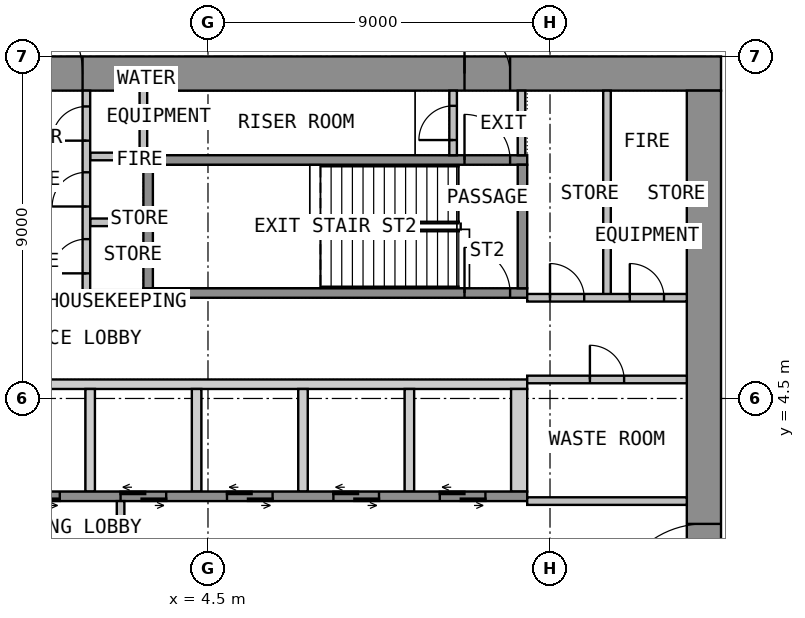
"""IFC4 building model, lengths in metres.
Left out: names, types, materials, properties, quantities, classifications, styles, units other than length and angle.
Written with IfcOpenShell. Run it as: python <this file> out.ifc"""

import sys

from ifc_helpers import new_model, si_unit, direction, frame, frame_2d, origin, place, context, subcontext, project, spatial, polyline, rectangle, outline, extrude, element, fill, save


model = new_model("IFC4")
c1 = context("Model", 3, precision=1e-05, world=origin(), true_north=direction((0.0, 1.0)))
c2 = subcontext(c1, "Body", "Model", "MODEL_VIEW")
j1 = project(units=[si_unit("LENGTHUNIT", "METRE"), si_unit("PLANEANGLEUNIT", "RADIAN")], contexts=[c1])
p1 = place(None, origin())
s1 = spatial("IfcSite", under=j1, at=p1, CompositionType="ELEMENT")
p2 = place(p1, origin())
s2 = spatial("IfcBuilding", under=s1, at=p2, CompositionType="ELEMENT")
p3 = place(p2, frame((0.0, 0.0, 15.6)))
s3 = spatial("IfcBuildingStorey", under=s2, at=p3, CompositionType="ELEMENT", Elevation=15.6)
p4 = place(p3, frame((-18.0, 13.05, 0.0), z_axis=(0.0, 0.0, 1.0), x_axis=(1.0, 0.0, 0.0)))
e1 = element("IfcWall", 1, at=p4, inside=s3, PredefinedType="SHEAR", context=c2, shape_type="SweptSolid", body=[
    extrude(rectangle(XDim=36.0, YDim=0.9, at=frame_2d((18.0, 0.0))), origin(), (0.0, 0.0, 1.0), 4.4),
])
p5 = place(p4, frame((16.8, 0.0, 0.0)))
e2 = element("IfcOpeningElement", 2, at=p5, cuts=e1, PredefinedType="OPENING", context=c2, shape_type="SweptSolid", body=[
    extrude(rectangle(XDim=2.4, YDim=2.1, at=frame_2d((1.2, 1.05))), frame((0.0, 0.46, 0.0), z_axis=(0.0, -1.0, 0.0), x_axis=(1.0, 0.0, 0.0)), (0.0, 0.0, 1.0), 0.92),
])
p6 = place(p4, frame((5.55, 0.0, 0.0)))
e3 = element("IfcOpeningElement", 3, at=p6, cuts=e1, PredefinedType="OPENING", context=c2, shape_type="SweptSolid", body=[
    extrude(rectangle(XDim=1.2, YDim=2.1, at=frame_2d((0.6, 1.05))), frame((0.0, 0.46, 0.0), z_axis=(0.0, -1.0, 0.0), x_axis=(1.0, 0.0, 0.0)), (0.0, 0.0, 1.0), 0.92),
])
p7 = place(p4, frame((29.25, 0.0, 0.0)))
e4 = element("IfcOpeningElement", 4, at=p7, cuts=e1, PredefinedType="OPENING", context=c2, shape_type="SweptSolid", body=[
    extrude(rectangle(XDim=1.2, YDim=2.1, at=frame_2d((0.6, 1.05))), frame((0.0, 0.46, 0.0), z_axis=(0.0, -1.0, 0.0), x_axis=(1.0, 0.0, 0.0)), (0.0, 0.0, 1.0), 0.92),
])
p8 = place(p3, frame((17.55, -12.6, 0.0), z_axis=(0.0, 0.0, 1.0), x_axis=(0.0, 1.0, 0.0)))
e5 = element("IfcWall", 5, at=p8, inside=s3, PredefinedType="SHEAR", context=c2, shape_type="SweptSolid", body=[
    extrude(rectangle(XDim=25.2, YDim=0.9, at=frame_2d((12.6, 0.0))), origin(), (0.0, 0.0, 1.0), 4.4),
])
p9 = place(p8, frame((11.4, 0.0, 0.0)))
e6 = element("IfcOpeningElement", 6, at=p9, cuts=e5, PredefinedType="OPENING", context=c2, shape_type="SweptSolid", body=[
    extrude(rectangle(XDim=2.4, YDim=2.1, at=frame_2d((1.2, 1.05))), frame((0.0, 0.46, 0.0), z_axis=(0.0, -1.0, 0.0), x_axis=(1.0, 0.0, 0.0)), (0.0, 0.0, 1.0), 0.92),
])
p10 = place(p3, origin())
e7 = element("IfcWall", 7, at=p10, inside=s3, PredefinedType="SHEAR", context=c2, shape_type="SweptSolid", body=[
    extrude(outline(polyline([(-12.9, 4.75), (12.9, 4.75), (12.9, 5.0), (-12.9, 5.0), (-12.9, 4.75)])), origin(), (0.0, 0.0, 1.0), 4.4),
])
p11 = place(p3, origin())
e8 = element("IfcWall", 8, at=p11, inside=s3, PredefinedType="SHEAR", context=c2, shape_type="SweptSolid", body=[
    extrude(outline(polyline([(1.275, 2.05), (1.525, 2.05), (1.525, 4.75), (1.275, 4.75), (1.275, 2.05)])), origin(), (0.0, 0.0, 1.0), 4.4),
])
p12 = place(p3, origin())
e9 = element("IfcWall", 9, at=p12, inside=s3, PredefinedType="SHEAR", context=c2, shape_type="SweptSolid", body=[
    extrude(outline(polyline([(4.075, 2.05), (4.325, 2.05), (4.325, 4.75), (4.075, 4.75), (4.075, 2.05)])), origin(), (0.0, 0.0, 1.0), 4.4),
])
p13 = place(p3, origin())
e10 = element("IfcWall", 10, at=p13, inside=s3, PredefinedType="SHEAR", context=c2, shape_type="SweptSolid", body=[
    extrude(outline(polyline([(6.875, 2.05), (7.125, 2.05), (7.125, 4.75), (6.875, 4.75), (6.875, 2.05)])), origin(), (0.0, 0.0, 1.0), 4.4),
])
p14 = place(p3, origin())
e11 = element("IfcWall", 11, at=p14, inside=s3, PredefinedType="SHEAR", context=c2, shape_type="SweptSolid", body=[
    extrude(outline(polyline([(9.675, 2.05), (9.925, 2.05), (9.925, 4.75), (9.675, 4.75), (9.675, 2.05)])), origin(), (0.0, 0.0, 1.0), 4.4),
])
p15 = place(p3, origin())
e12 = element("IfcWall", 12, at=p15, inside=s3, PredefinedType="SHEAR", context=c2, shape_type="SweptSolid", body=[
    extrude(outline(polyline([(12.475, 2.05), (12.9, 2.05), (12.9, 4.75), (12.475, 4.75), (12.475, 2.05)])), origin(), (0.0, 0.0, 1.0), 4.4),
])
p16 = place(p3, frame((-12.9, 1.925, 0.0), z_axis=(0.0, 0.0, 1.0), x_axis=(1.0, 0.0, 0.0)))
e13 = element("IfcWall", 13, at=p16, inside=s3, PredefinedType="SHEAR", context=c2, shape_type="SweptSolid", body=[
    extrude(rectangle(XDim=25.8, YDim=0.25, at=frame_2d((12.9, 0.0))), origin(), (0.0, 0.0, 1.0), 4.4),
])
p17 = place(p16, frame((9.5, 0.0, 0.0)))
e14 = element("IfcOpeningElement", 14, at=p17, cuts=e13, PredefinedType="OPENING", context=c2, shape_type="SweptSolid", body=[
    extrude(rectangle(XDim=1.2, YDim=2.1, at=frame_2d((0.6, 1.05))), frame((0.0, 0.135, 0.0), z_axis=(0.0, -1.0, 0.0), x_axis=(1.0, 0.0, 0.0)), (0.0, 0.0, 1.0), 0.27),
])
p18 = place(p16, frame((12.3, 0.0, 0.0)))
e15 = element("IfcOpeningElement", 15, at=p18, cuts=e13, PredefinedType="OPENING", context=c2, shape_type="SweptSolid", body=[
    extrude(rectangle(XDim=1.2, YDim=2.1, at=frame_2d((0.6, 1.05))), frame((0.0, 0.135, 0.0), z_axis=(0.0, -1.0, 0.0), x_axis=(1.0, 0.0, 0.0)), (0.0, 0.0, 1.0), 0.27),
])
p19 = place(p16, frame((15.1, 0.0, 0.0)))
e16 = element("IfcOpeningElement", 16, at=p19, cuts=e13, PredefinedType="OPENING", context=c2, shape_type="SweptSolid", body=[
    extrude(rectangle(XDim=1.2, YDim=2.1, at=frame_2d((0.6, 1.05))), frame((0.0, 0.135, 0.0), z_axis=(0.0, -1.0, 0.0), x_axis=(1.0, 0.0, 0.0)), (0.0, 0.0, 1.0), 0.27),
])
p20 = place(p16, frame((17.9, 0.0, 0.0)))
e17 = element("IfcOpeningElement", 17, at=p20, cuts=e13, PredefinedType="OPENING", context=c2, shape_type="SweptSolid", body=[
    extrude(rectangle(XDim=1.2, YDim=2.1, at=frame_2d((0.6, 1.05))), frame((0.0, 0.135, 0.0), z_axis=(0.0, -1.0, 0.0), x_axis=(1.0, 0.0, 0.0)), (0.0, 0.0, 1.0), 0.27),
])
p21 = place(p16, frame((20.7, 0.0, 0.0)))
e18 = element("IfcOpeningElement", 18, at=p21, cuts=e13, PredefinedType="OPENING", context=c2, shape_type="SweptSolid", body=[
    extrude(rectangle(XDim=1.2, YDim=2.1, at=frame_2d((0.6, 1.05))), frame((0.0, 0.135, 0.0), z_axis=(0.0, -1.0, 0.0), x_axis=(1.0, 0.0, 0.0)), (0.0, 0.0, 1.0), 0.27),
])
p22 = place(p16, frame((23.5, 0.0, 0.0)))
e19 = element("IfcOpeningElement", 19, at=p22, cuts=e13, PredefinedType="OPENING", context=c2, shape_type="SweptSolid", body=[
    extrude(rectangle(XDim=1.2, YDim=2.1, at=frame_2d((0.6, 1.05))), frame((0.0, 0.135, 0.0), z_axis=(0.0, -1.0, 0.0), x_axis=(1.0, 0.0, 0.0)), (0.0, 0.0, 1.0), 0.27),
])
p23 = place(p3, frame((2.2, -1.8, 0.0), z_axis=(0.0, 0.0, 1.0), x_axis=(0.0, 1.0, 0.0)))
e20 = element("IfcWall", 20, at=p23, inside=s3, PredefinedType="PARTITIONING", context=c2, shape_type="SweptSolid", body=[
    extrude(rectangle(XDim=3.6, YDim=0.2, at=frame_2d((1.8, 0.0))), origin(), (0.0, 0.0, 1.0), 4.4),
])
p24 = place(p23, frame((1.2, 0.0, 0.0)))
e21 = element("IfcOpeningElement", 21, at=p24, cuts=e20, PredefinedType="OPENING", context=c2, shape_type="SweptSolid", body=[
    extrude(rectangle(XDim=1.2, YDim=2.1, at=frame_2d((0.6, 1.05))), frame((0.0, 0.11, 0.0), z_axis=(0.0, -1.0, 0.0), x_axis=(1.0, 0.0, 0.0)), (0.0, 0.0, 1.0), 0.22),
])
p25 = place(p3, frame((2.8, 7.275, 0.0), z_axis=(0.0, 0.0, 1.0), x_axis=(1.0, 0.0, 0.0)))
e22 = element("IfcWall", 22, at=p25, inside=s3, PredefinedType="SHEAR", context=c2, shape_type="SweptSolid", body=[
    extrude(rectangle(XDim=10.1, YDim=0.25, at=frame_2d((5.05, 0.0))), origin(), (0.0, 0.0, 1.0), 4.4),
])
p26 = place(p25, frame((8.45, 0.0, 0.0)))
e23 = element("IfcOpeningElement", 23, at=p26, cuts=e22, PredefinedType="OPENING", context=c2, shape_type="SweptSolid", body=[
    extrude(rectangle(XDim=1.2, YDim=2.1, at=frame_2d((0.6, 1.05))), frame((0.0, 0.135, 0.0), z_axis=(0.0, -1.0, 0.0), x_axis=(1.0, 0.0, 0.0)), (0.0, 0.0, 1.0), 0.27),
])
p27 = place(p3, frame((2.8, 10.775, 0.0), z_axis=(0.0, 0.0, 1.0), x_axis=(1.0, 0.0, 0.0)))
e24 = element("IfcWall", 24, at=p27, inside=s3, PredefinedType="SHEAR", context=c2, shape_type="SweptSolid", body=[
    extrude(rectangle(XDim=10.1, YDim=0.25, at=frame_2d((5.05, 0.0))), origin(), (0.0, 0.0, 1.0), 4.4),
])
p28 = place(p27, frame((8.45, 0.0, 0.0)))
e25 = element("IfcOpeningElement", 25, at=p28, cuts=e24, PredefinedType="OPENING", context=c2, shape_type="SweptSolid", body=[
    extrude(rectangle(XDim=1.2, YDim=2.1, at=frame_2d((0.6, 1.05))), frame((0.0, 0.135, 0.0), z_axis=(0.0, -1.0, 0.0), x_axis=(1.0, 0.0, 0.0)), (0.0, 0.0, 1.0), 0.27),
])
for number, where, z_axis, x_axis in (
    (26, (2.925, 7.4, 0.0), (0.0, 0.0, 1.0), (0.0, 1.0, 0.0)),
    (27, (12.775, 7.4, 0.0), (0.0, 0.0, 1.0), (0.0, 1.0, 0.0)),
):
    element("IfcWall", number, at=place(p3, frame(where, z_axis=z_axis, x_axis=x_axis)), inside=s3, PredefinedType="SHEAR", context=c2, shape_type="SweptSolid", body=[
        extrude(rectangle(XDim=3.25, YDim=0.25, at=frame_2d((1.625, 0.0))), origin(), (0.0, 0.0, 1.0), 4.4),
    ])
for number, where, z_axis, x_axis in (
    (28, (1.4, 7.25, 0.0), (0.0, 0.0, 1.0), (1.0, 0.0, 0.0)),
    (29, (1.4, 9.135, 0.0), (0.0, 0.0, 1.0), (1.0, 0.0, 0.0)),
    (30, (1.4, 10.867, 0.0), (0.0, 0.0, 1.0), (1.0, 0.0, 0.0)),
):
    element("IfcWall", number, at=place(p3, frame(where, z_axis=z_axis, x_axis=x_axis)), inside=s3, PredefinedType="PARTITIONING", context=c2, shape_type="SweptSolid", body=[
        extrude(rectangle(XDim=1.4, YDim=0.2, at=frame_2d((0.7, 0.0))), origin(), (0.0, 0.0, 1.0), 4.4),
    ])
p29 = place(p3, frame((1.3, 7.15, 0.0), z_axis=(0.0, 0.0, 1.0), x_axis=(0.0, 1.0, 0.0)))
e31 = element("IfcWall", 31, at=p29, inside=s3, PredefinedType="PARTITIONING", context=c2, shape_type="SweptSolid", body=[
    extrude(rectangle(XDim=5.45, YDim=0.2, at=frame_2d((2.725, 0.0))), origin(), (0.0, 0.0, 1.0), 4.4),
])
p30 = place(p29, frame((0.643, 0.0, 0.0)))
e32 = element("IfcOpeningElement", 32, at=p30, cuts=e31, PredefinedType="OPENING", context=c2, shape_type="SweptSolid", body=[
    extrude(rectangle(XDim=0.9, YDim=2.1, at=frame_2d((0.45, 1.05))), frame((0.0, 0.11, 0.0), z_axis=(0.0, -1.0, 0.0), x_axis=(1.0, 0.0, 0.0)), (0.0, 0.0, 1.0), 0.22),
])
p31 = place(p29, frame((2.401, 0.0, 0.0)))
e33 = element("IfcOpeningElement", 33, at=p31, cuts=e31, PredefinedType="OPENING", context=c2, shape_type="SweptSolid", body=[
    extrude(rectangle(XDim=0.9, YDim=2.1, at=frame_2d((0.45, 1.05))), frame((0.0, 0.11, 0.0), z_axis=(0.0, -1.0, 0.0), x_axis=(1.0, 0.0, 0.0)), (0.0, 0.0, 1.0), 0.22),
])
p32 = place(p29, frame((4.134, 0.0, 0.0)))
e34 = element("IfcOpeningElement", 34, at=p32, cuts=e31, PredefinedType="OPENING", context=c2, shape_type="SweptSolid", body=[
    extrude(rectangle(XDim=0.9, YDim=2.1, at=frame_2d((0.45, 1.05))), frame((0.0, 0.11, 0.0), z_axis=(0.0, -1.0, 0.0), x_axis=(1.0, 0.0, 0.0)), (0.0, 0.0, 1.0), 0.22),
])
p33 = place(p3, frame((12.75, 10.9, 0.0), z_axis=(0.0, 0.0, 1.0), x_axis=(0.0, 1.0, 0.0)))
e35 = element("IfcWall", 35, at=p33, inside=s3, PredefinedType="PARTITIONING", context=c2, shape_type="SweptSolid", body=[
    extrude(rectangle(XDim=1.7, YDim=0.2, at=frame_2d((0.85, 0.0))), origin(), (0.0, 0.0, 1.0), 4.4),
])
p34 = place(p3, frame((10.95, 10.9, 0.0), z_axis=(0.0, 0.0, 1.0), x_axis=(0.0, 1.0, 0.0)))
e36 = element("IfcWall", 36, at=p34, inside=s3, PredefinedType="PARTITIONING", context=c2, shape_type="SweptSolid", body=[
    extrude(rectangle(XDim=1.7, YDim=0.2, at=frame_2d((0.85, 0.0))), origin(), (0.0, 0.0, 1.0), 4.4),
])
p35 = place(p34, frame((0.4, 0.0, 0.0)))
e37 = element("IfcOpeningElement", 37, at=p35, cuts=e36, PredefinedType="OPENING", context=c2, shape_type="SweptSolid", body=[
    extrude(rectangle(XDim=0.9, YDim=2.1, at=frame_2d((0.45, 1.05))), frame((0.0, 0.11, 0.0), z_axis=(0.0, -1.0, 0.0), x_axis=(1.0, 0.0, 0.0)), (0.0, 0.0, 1.0), 0.22),
])
p36 = place(p3, frame((15.0, 7.15, 0.0), z_axis=(0.0, 0.0, 1.0), x_axis=(0.0, 1.0, 0.0)))
e38 = element("IfcWall", 38, at=p36, inside=s3, PredefinedType="PARTITIONING", context=c2, shape_type="SweptSolid", body=[
    extrude(rectangle(XDim=5.45, YDim=0.2, at=frame_2d((2.725, 0.0))), origin(), (0.0, 0.0, 1.0), 4.4),
])
p37 = place(p3, frame((12.9, 7.15, 0.0), z_axis=(0.0, 0.0, 1.0), x_axis=(1.0, 0.0, 0.0)))
e39 = element("IfcWall", 39, at=p37, inside=s3, PredefinedType="PARTITIONING", context=c2, shape_type="SweptSolid", body=[
    extrude(rectangle(XDim=4.2, YDim=0.2, at=frame_2d((2.1, 0.0))), origin(), (0.0, 0.0, 1.0), 4.4),
])
p38 = place(p37, frame((0.6, 0.0, 0.0)))
e40 = element("IfcOpeningElement", 40, at=p38, cuts=e39, PredefinedType="OPENING", context=c2, shape_type="SweptSolid", body=[
    extrude(rectangle(XDim=0.9, YDim=2.1, at=frame_2d((0.45, 1.05))), frame((0.0, 0.11, 0.0), z_axis=(0.0, -1.0, 0.0), x_axis=(1.0, 0.0, 0.0)), (0.0, 0.0, 1.0), 0.22),
])
p39 = place(p37, frame((2.7, 0.0, 0.0)))
e41 = element("IfcOpeningElement", 41, at=p39, cuts=e39, PredefinedType="OPENING", context=c2, shape_type="SweptSolid", body=[
    extrude(rectangle(XDim=0.9, YDim=2.1, at=frame_2d((0.45, 1.05))), frame((0.0, 0.11, 0.0), z_axis=(0.0, -1.0, 0.0), x_axis=(1.0, 0.0, 0.0)), (0.0, 0.0, 1.0), 0.22),
])
p40 = place(p3, frame((12.9, 5.0, 0.0), z_axis=(0.0, 0.0, 1.0), x_axis=(1.0, 0.0, 0.0)))
e42 = element("IfcWall", 42, at=p40, inside=s3, PredefinedType="PARTITIONING", context=c2, shape_type="SweptSolid", body=[
    extrude(rectangle(XDim=4.2, YDim=0.2, at=frame_2d((2.1, 0.0))), origin(), (0.0, 0.0, 1.0), 4.4),
])
p41 = place(p40, frame((1.65, 0.0, 0.0)))
e43 = element("IfcOpeningElement", 43, at=p41, cuts=e42, PredefinedType="OPENING", context=c2, shape_type="SweptSolid", body=[
    extrude(rectangle(XDim=0.9, YDim=2.1, at=frame_2d((0.45, 1.05))), frame((0.0, 0.11, 0.0), z_axis=(0.0, -1.0, 0.0), x_axis=(1.0, 0.0, 0.0)), (0.0, 0.0, 1.0), 0.22),
])
p42 = place(p3, frame((12.9, 1.8, 0.0), z_axis=(0.0, 0.0, 1.0), x_axis=(1.0, 0.0, 0.0)))
e44 = element("IfcWall", 44, at=p42, inside=s3, PredefinedType="PARTITIONING", context=c2, shape_type="SweptSolid", body=[
    extrude(rectangle(XDim=4.2, YDim=0.2, at=frame_2d((2.1, 0.0))), origin(), (0.0, 0.0, 1.0), 4.4),
])
p43 = place(p3, frame((2.8, 10.969, 0.0), z_axis=(0.0, 0.0, 1.0), x_axis=(0.0, 1.0, 0.0)))
e45 = element("IfcWall", 45, at=p43, inside=s3, PredefinedType="PARTITIONING", context=c2, shape_type="SweptSolid", body=[
    extrude(rectangle(XDim=1.631, YDim=0.2, at=frame_2d((0.815, 0.0))), origin(), (0.0, 0.0, 1.0), 4.4),
])
p44 = place(p9, origin())
e46 = element("IfcDoor", 46, at=p44, inside=s3, OperationType="DOUBLE_DOOR_DOUBLE_SWING", PredefinedType="DOOR", context=c2, shape_type="SweptSolid", body=[
    extrude(rectangle(XDim=2.4, YDim=2.1, at=frame_2d((1.2, 1.05))), frame((0.0, 0.025, 0.0), z_axis=(0.0, -1.0, 0.0), x_axis=(1.0, 0.0, 0.0)), (0.0, 0.0, 1.0), 0.05),
])
fill(e6, e46)
p45 = place(p5, origin())
e47 = element("IfcDoor", 47, at=p45, inside=s3, OperationType="DOUBLE_DOOR_DOUBLE_SWING", PredefinedType="DOOR", context=c2, shape_type="SweptSolid", body=[
    extrude(rectangle(XDim=2.4, YDim=2.1, at=frame_2d((1.2, 1.05))), frame((0.0, 0.025, 0.0), z_axis=(0.0, -1.0, 0.0), x_axis=(1.0, 0.0, 0.0)), (0.0, 0.0, 1.0), 0.05),
])
fill(e2, e47)
p46 = place(p7, origin())
e48 = element("IfcDoor", 48, at=p46, inside=s3, OperationType="SINGLE_SWING_RIGHT", PredefinedType="DOOR", context=c2, shape_type="SweptSolid", body=[
    extrude(rectangle(XDim=1.2, YDim=2.1, at=frame_2d((0.6, 1.05))), frame((0.0, 0.025, 0.0), z_axis=(0.0, -1.0, 0.0), x_axis=(1.0, 0.0, 0.0)), (0.0, 0.0, 1.0), 0.05),
])
fill(e4, e48)
p47 = place(p18, origin())
e49 = element("IfcDoor", 49, at=p47, inside=s3, OperationType="DOUBLE_DOOR_SLIDING", PredefinedType="DOOR", context=c2, shape_type="SweptSolid", body=[
    extrude(rectangle(XDim=1.2, YDim=2.1, at=frame_2d((0.6, 1.05))), frame((0.0, 0.025, 0.0), z_axis=(0.0, -1.0, 0.0), x_axis=(1.0, 0.0, 0.0)), (0.0, 0.0, 1.0), 0.05),
])
fill(e15, e49)
p48 = place(p19, origin())
e50 = element("IfcDoor", 50, at=p48, inside=s3, OperationType="DOUBLE_DOOR_SLIDING", PredefinedType="DOOR", context=c2, shape_type="SweptSolid", body=[
    extrude(rectangle(XDim=1.2, YDim=2.1, at=frame_2d((0.6, 1.05))), frame((0.0, 0.025, 0.0), z_axis=(0.0, -1.0, 0.0), x_axis=(1.0, 0.0, 0.0)), (0.0, 0.0, 1.0), 0.05),
])
fill(e16, e50)
p49 = place(p20, origin())
e51 = element("IfcDoor", 51, at=p49, inside=s3, OperationType="DOUBLE_DOOR_SLIDING", PredefinedType="DOOR", context=c2, shape_type="SweptSolid", body=[
    extrude(rectangle(XDim=1.2, YDim=2.1, at=frame_2d((0.6, 1.05))), frame((0.0, 0.025, 0.0), z_axis=(0.0, -1.0, 0.0), x_axis=(1.0, 0.0, 0.0)), (0.0, 0.0, 1.0), 0.05),
])
fill(e17, e51)
p50 = place(p21, origin())
e52 = element("IfcDoor", 52, at=p50, inside=s3, OperationType="DOUBLE_DOOR_SLIDING", PredefinedType="DOOR", context=c2, shape_type="SweptSolid", body=[
    extrude(rectangle(XDim=1.2, YDim=2.1, at=frame_2d((0.6, 1.05))), frame((0.0, 0.025, 0.0), z_axis=(0.0, -1.0, 0.0), x_axis=(1.0, 0.0, 0.0)), (0.0, 0.0, 1.0), 0.05),
])
fill(e18, e52)
p51 = place(p22, origin())
e53 = element("IfcDoor", 53, at=p51, inside=s3, OperationType="DOUBLE_DOOR_SLIDING", PredefinedType="DOOR", context=c2, shape_type="SweptSolid", body=[
    extrude(rectangle(XDim=1.2, YDim=2.1, at=frame_2d((0.6, 1.05))), frame((0.0, 0.025, 0.0), z_axis=(0.0, -1.0, 0.0), x_axis=(1.0, 0.0, 0.0)), (0.0, 0.0, 1.0), 0.05),
])
fill(e19, e53)
p52 = place(p26, origin())
e54 = element("IfcDoor", 54, at=p52, inside=s3, OperationType="SINGLE_SWING_LEFT", PredefinedType="DOOR", context=c2, shape_type="SweptSolid", body=[
    extrude(rectangle(XDim=1.2, YDim=2.1, at=frame_2d((0.6, 1.05))), frame((0.0, 0.025, 0.0), z_axis=(0.0, -1.0, 0.0), x_axis=(1.0, 0.0, 0.0)), (0.0, 0.0, 1.0), 0.05),
])
fill(e23, e54)
p53 = place(p30, origin())
e55 = element("IfcDoor", 55, at=p53, inside=s3, OperationType="SINGLE_SWING_LEFT", PredefinedType="DOOR", context=c2, shape_type="SweptSolid", body=[
    extrude(rectangle(XDim=0.9, YDim=2.1, at=frame_2d((0.45, 1.05))), frame((0.0, 0.025, 0.0), z_axis=(0.0, -1.0, 0.0), x_axis=(1.0, 0.0, 0.0)), (0.0, 0.0, 1.0), 0.05),
])
fill(e32, e55)
p54 = place(p31, origin())
e56 = element("IfcDoor", 56, at=p54, inside=s3, OperationType="SINGLE_SWING_LEFT", PredefinedType="DOOR", context=c2, shape_type="SweptSolid", body=[
    extrude(rectangle(XDim=0.9, YDim=2.1, at=frame_2d((0.45, 1.05))), frame((0.0, 0.025, 0.0), z_axis=(0.0, -1.0, 0.0), x_axis=(1.0, 0.0, 0.0)), (0.0, 0.0, 1.0), 0.05),
])
fill(e33, e56)
p55 = place(p32, origin())
e57 = element("IfcDoor", 57, at=p55, inside=s3, OperationType="SINGLE_SWING_LEFT", PredefinedType="DOOR", context=c2, shape_type="SweptSolid", body=[
    extrude(rectangle(XDim=0.9, YDim=2.1, at=frame_2d((0.45, 1.05))), frame((0.0, 0.025, 0.0), z_axis=(0.0, -1.0, 0.0), x_axis=(1.0, 0.0, 0.0)), (0.0, 0.0, 1.0), 0.05),
])
fill(e34, e57)
p56 = place(p28, origin())
e58 = element("IfcDoor", 58, at=p56, inside=s3, OperationType="SINGLE_SWING_RIGHT", PredefinedType="DOOR", context=c2, shape_type="SweptSolid", body=[
    extrude(rectangle(XDim=1.2, YDim=2.1, at=frame_2d((0.6, 1.05))), frame((0.0, 0.025, 0.0), z_axis=(0.0, -1.0, 0.0), x_axis=(1.0, 0.0, 0.0)), (0.0, 0.0, 1.0), 0.05),
])
fill(e25, e58)
p57 = place(p35, origin())
e59 = element("IfcDoor", 59, at=p57, inside=s3, OperationType="SINGLE_SWING_LEFT", PredefinedType="DOOR", context=c2, shape_type="SweptSolid", body=[
    extrude(rectangle(XDim=0.9, YDim=2.1, at=frame_2d((0.45, 1.05))), frame((0.0, 0.025, 0.0), z_axis=(0.0, -1.0, 0.0), x_axis=(1.0, 0.0, 0.0)), (0.0, 0.0, 1.0), 0.05),
])
fill(e37, e59)
p58 = place(p38, origin())
e60 = element("IfcDoor", 60, at=p58, inside=s3, OperationType="SINGLE_SWING_LEFT", PredefinedType="DOOR", context=c2, shape_type="SweptSolid", body=[
    extrude(rectangle(XDim=0.9, YDim=2.1, at=frame_2d((0.45, 1.05))), frame((0.0, 0.025, 0.0), z_axis=(0.0, -1.0, 0.0), x_axis=(1.0, 0.0, 0.0)), (0.0, 0.0, 1.0), 0.05),
])
fill(e40, e60)
p59 = place(p39, origin())
e61 = element("IfcDoor", 61, at=p59, inside=s3, OperationType="SINGLE_SWING_LEFT", PredefinedType="DOOR", context=c2, shape_type="SweptSolid", body=[
    extrude(rectangle(XDim=0.9, YDim=2.1, at=frame_2d((0.45, 1.05))), frame((0.0, 0.025, 0.0), z_axis=(0.0, -1.0, 0.0), x_axis=(1.0, 0.0, 0.0)), (0.0, 0.0, 1.0), 0.05),
])
fill(e41, e61)
p60 = place(p41, origin())
e62 = element("IfcDoor", 62, at=p60, inside=s3, OperationType="SINGLE_SWING_LEFT", PredefinedType="DOOR", context=c2, shape_type="SweptSolid", body=[
    extrude(rectangle(XDim=0.9, YDim=2.1, at=frame_2d((0.45, 1.05))), frame((0.0, 0.025, 0.0), z_axis=(0.0, -1.0, 0.0), x_axis=(1.0, 0.0, 0.0)), (0.0, 0.0, 1.0), 0.05),
])
fill(e43, e62)
save(model, sys.argv[1])
